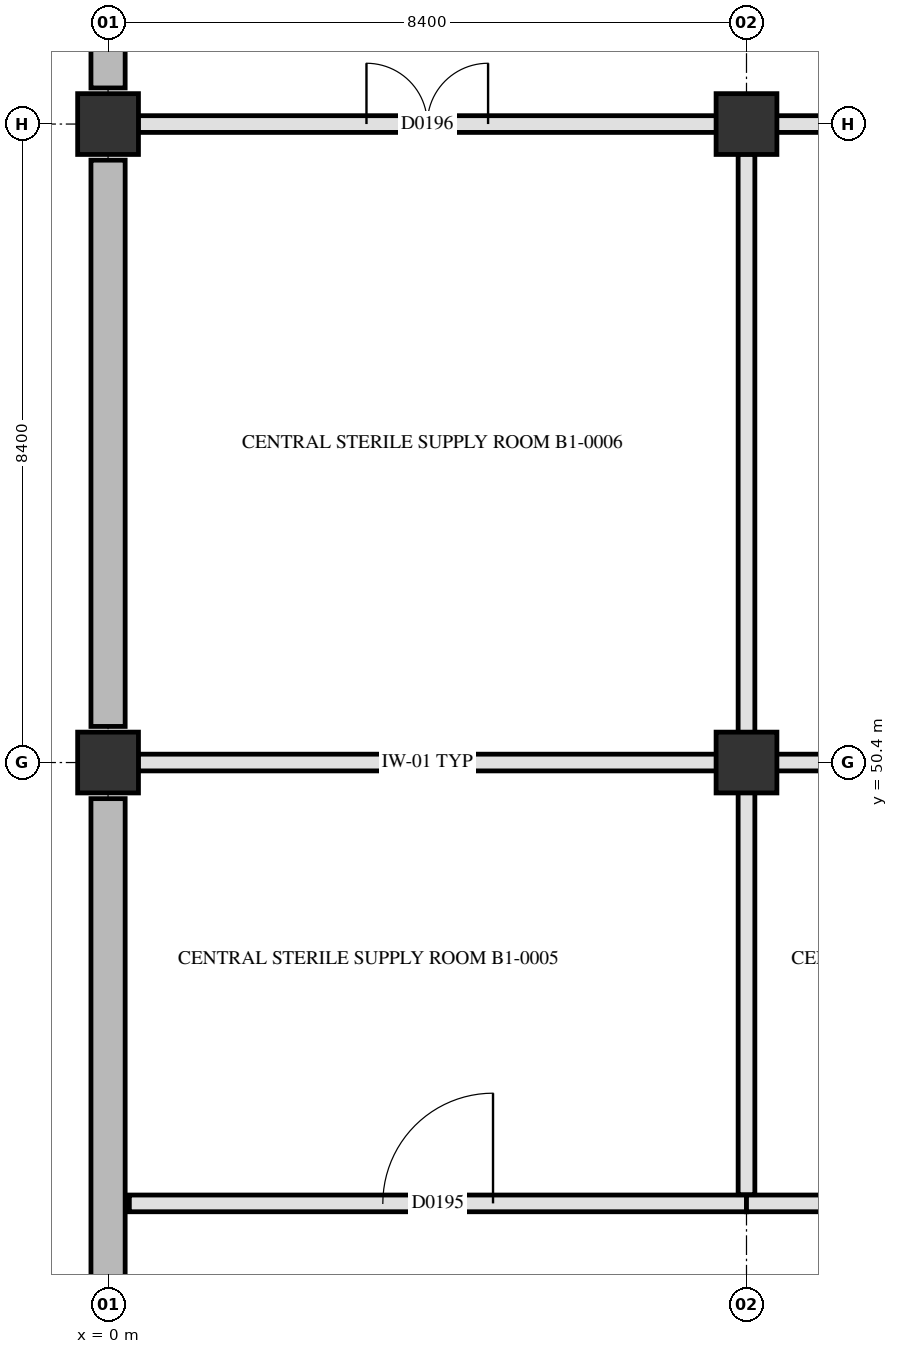
"""IFC4 building model, lengths in metres.
Left out: names, types, materials, properties, quantities, classifications, styles, units other than length and angle.
Written with IfcOpenShell. Run it as: python <this file> out.ifc"""

import sys

from ifc_helpers import new_model, si_unit, direction, frame, frame_2d, origin, origin_2d, place, context, subcontext, project, spatial, rectangle, extrude, element, fill, save


model = new_model("IFC4")
c1 = context("Model", 3, precision=1e-05, world=origin(), true_north=direction((0.0, 1.0)))
c2 = subcontext(c1, "Body", "Model", "MODEL_VIEW")
j1 = project(units=[si_unit("LENGTHUNIT", "METRE"), si_unit("PLANEANGLEUNIT", "RADIAN")], contexts=[c1])
p1 = place(None, origin())
s1 = spatial("IfcSite", under=j1, at=p1, CompositionType="ELEMENT")
p2 = place(p1, origin())
s2 = spatial("IfcBuilding", under=s1, at=p2, CompositionType="ELEMENT")
p3 = place(p2, frame((0.0, 0.0, -5.4)))
s3 = spatial("IfcBuildingStorey", under=s2, at=p3, CompositionType="ELEMENT", Elevation=-5.4)
for number, where, z_axis, x_axis in (
    (1, (0.0, 50.4, 0.0), (0.0, 0.0, 1.0), (1.0, 0.0, 0.0)),
    (2, (0.0, 58.8, 0.0), (0.0, 0.0, 1.0), (1.0, 0.0, 0.0)),
    (3, (8.4, 50.4, 0.0), (0.0, 0.0, 1.0), (1.0, 0.0, 0.0)),
    (4, (8.4, 58.8, 0.0), (0.0, 0.0, 1.0), (1.0, 0.0, 0.0)),
):
    element("IfcColumn", number, at=place(p3, frame(where, z_axis=z_axis, x_axis=x_axis)), inside=s3, PredefinedType="COLUMN", context=c2, shape_type="SweptSolid", body=[
        extrude(rectangle(XDim=0.8, YDim=0.8, at=origin_2d()), origin(), (0.0, 0.0, 1.0), 5.4),
    ])
p4 = place(p3, frame((0.0, 59.275, 0.0), z_axis=(0.0, 0.0, 1.0), x_axis=(0.0, 1.0, 0.0)))
e5 = element("IfcWall", 5, at=p4, inside=s3, PredefinedType="SOLIDWALL", context=c2, shape_type="SweptSolid", body=[
    extrude(rectangle(XDim=7.45, YDim=0.45, at=frame_2d((3.725, 0.0))), origin(), (0.0, 0.0, 1.0), 5.08),
])
for number, where, z_axis, x_axis in (
    (6, (0.0, 42.475, 0.0), (0.0, 0.0, 1.0), (0.0, 1.0, 0.0)),
    (7, (0.0, 50.875, 0.0), (0.0, 0.0, 1.0), (0.0, 1.0, 0.0)),
):
    element("IfcWall", number, at=place(p3, frame(where, z_axis=z_axis, x_axis=x_axis)), inside=s3, PredefinedType="SOLIDWALL", context=c2, shape_type="SweptSolid", body=[
        extrude(rectangle(XDim=7.45, YDim=0.45, at=frame_2d((3.725, 0.0))), origin(), (0.0, 0.0, 1.0), 5.08),
    ])
p5 = place(p3, frame((0.28, 44.6, 0.0), z_axis=(0.0, 0.0, 1.0), x_axis=(1.0, 0.0, 0.0)))
e8 = element("IfcWall", 8, at=p5, inside=s3, PredefinedType="PARTITIONING", context=c2, shape_type="SweptSolid", body=[
    extrude(rectangle(XDim=8.12, YDim=0.22, at=frame_2d((4.06, 0.0))), origin(), (0.0, 0.0, 1.0), 4.47),
])
p6 = place(p5, frame((3.335, 0.0, 0.0)))
e9 = element("IfcOpeningElement", 9, at=p6, cuts=e8, PredefinedType="OPENING", context=c2, shape_type="SweptSolid", body=[
    extrude(rectangle(XDim=1.45, YDim=2.2, at=frame_2d((0.725, 1.1))), frame((0.0, 0.12, 0.0), z_axis=(0.0, -1.0, 0.0), x_axis=(1.0, 0.0, 0.0)), (0.0, 0.0, 1.0), 0.24),
])
p7 = place(p3, frame((8.4, 44.6, 0.0), z_axis=(0.0, 0.0, 1.0), x_axis=(1.0, 0.0, 0.0)))
e10 = element("IfcWall", 10, at=p7, inside=s3, PredefinedType="PARTITIONING", context=c2, shape_type="SweptSolid", body=[
    extrude(rectangle(XDim=8.4, YDim=0.22, at=frame_2d((4.2, 0.0))), origin(), (0.0, 0.0, 1.0), 4.47),
])
p8 = place(p7, frame((3.33, 0.0, 0.0)))
e11 = element("IfcOpeningElement", 11, at=p8, cuts=e10, PredefinedType="OPENING", context=c2, shape_type="SweptSolid", body=[
    extrude(rectangle(XDim=1.74, YDim=2.24, at=frame_2d((0.87, 1.12))), frame((0.0, 0.12, 0.0), z_axis=(0.0, -1.0, 0.0), x_axis=(1.0, 0.0, 0.0)), (0.0, 0.0, 1.0), 0.24),
])
p9 = place(p3, frame((0.395, 50.4, 0.0), z_axis=(0.0, 0.0, 1.0), x_axis=(1.0, 0.0, 0.0)))
e12 = element("IfcWall", 12, at=p9, inside=s3, PredefinedType="PARTITIONING", context=c2, shape_type="SweptSolid", body=[
    extrude(rectangle(XDim=7.61, YDim=0.22, at=frame_2d((3.805, 0.0))), origin(), (0.0, 0.0, 1.0), 4.42),
])
p10 = place(p3, frame((8.795, 50.4, 0.0), z_axis=(0.0, 0.0, 1.0), x_axis=(1.0, 0.0, 0.0)))
e13 = element("IfcWall", 13, at=p10, inside=s3, PredefinedType="PARTITIONING", context=c2, shape_type="SweptSolid", body=[
    extrude(rectangle(XDim=7.61, YDim=0.22, at=frame_2d((3.805, 0.0))), origin(), (0.0, 0.0, 1.0), 4.42),
])
p11 = place(p3, frame((0.395, 58.8, 0.0), z_axis=(0.0, 0.0, 1.0), x_axis=(1.0, 0.0, 0.0)))
e14 = element("IfcWall", 14, at=p11, inside=s3, PredefinedType="PARTITIONING", context=c2, shape_type="SweptSolid", body=[
    extrude(rectangle(XDim=7.61, YDim=0.22, at=frame_2d((3.805, 0.0))), origin(), (0.0, 0.0, 1.0), 4.42),
])
p12 = place(p11, frame((3.005, 0.0, 0.0)))
e15 = element("IfcOpeningElement", 15, at=p12, cuts=e14, PredefinedType="OPENING", context=c2, shape_type="SweptSolid", body=[
    extrude(rectangle(XDim=1.6, YDim=2.25, at=frame_2d((0.8, 1.125))), frame((0.0, 0.12, 0.0), z_axis=(0.0, -1.0, 0.0), x_axis=(1.0, 0.0, 0.0)), (0.0, 0.0, 1.0), 0.24),
])
p13 = place(p3, frame((8.795, 58.8, 0.0), z_axis=(0.0, 0.0, 1.0), x_axis=(1.0, 0.0, 0.0)))
e16 = element("IfcWall", 16, at=p13, inside=s3, PredefinedType="PARTITIONING", context=c2, shape_type="SweptSolid", body=[
    extrude(rectangle(XDim=5.555, YDim=0.22, at=frame_2d((2.778, 0.0))), origin(), (0.0, 0.0, 1.0), 4.42),
])
p14 = place(p13, frame((1.857, 0.0, 0.0)))
e17 = element("IfcOpeningElement", 17, at=p14, cuts=e16, PredefinedType="OPENING", context=c2, shape_type="SweptSolid", body=[
    extrude(rectangle(XDim=1.84, YDim=2.28, at=frame_2d((0.92, 1.14))), frame((0.0, 0.12, 0.0), z_axis=(0.0, -1.0, 0.0), x_axis=(1.0, 0.0, 0.0)), (0.0, 0.0, 1.0), 0.24),
])
p15 = place(p3, frame((8.4, 44.715, 0.0), z_axis=(0.0, 0.0, 1.0), x_axis=(0.0, 1.0, 0.0)))
e18 = element("IfcWall", 18, at=p15, inside=s3, PredefinedType="PARTITIONING", context=c2, shape_type="SweptSolid", body=[
    extrude(rectangle(XDim=5.29, YDim=0.22, at=frame_2d((2.645, 0.0))), origin(), (0.0, 0.0, 1.0), 4.47),
])
p16 = place(p3, frame((8.4, 50.795, 0.0), z_axis=(0.0, 0.0, 1.0), x_axis=(0.0, 1.0, 0.0)))
e19 = element("IfcWall", 19, at=p16, inside=s3, PredefinedType="PARTITIONING", context=c2, shape_type="SweptSolid", body=[
    extrude(rectangle(XDim=7.61, YDim=0.22, at=frame_2d((3.805, 0.0))), origin(), (0.0, 0.0, 1.0), 4.47),
])
p17 = place(p6, origin())
e20 = element("IfcDoor", 20, at=p17, inside=s3, OperationType="SINGLE_SWING_RIGHT", PredefinedType="DOOR", context=c2, shape_type="SweptSolid", body=[
    extrude(rectangle(XDim=1.45, YDim=2.2, at=frame_2d((0.725, 1.1))), frame((0.0, 0.025, 0.0), z_axis=(0.0, -1.0, 0.0), x_axis=(1.0, 0.0, 0.0)), (0.0, 0.0, 1.0), 0.05),
])
fill(e9, e20)
p18 = place(p12, origin())
e21 = element("IfcDoor", 21, at=p18, inside=s3, OperationType="DOUBLE_SWING_LEFT", PredefinedType="DOOR", context=c2, shape_type="SweptSolid", body=[
    extrude(rectangle(XDim=1.6, YDim=2.25, at=frame_2d((0.8, 1.125))), frame((0.0, 0.025, 0.0), z_axis=(0.0, -1.0, 0.0), x_axis=(1.0, 0.0, 0.0)), (0.0, 0.0, 1.0), 0.05),
])
fill(e15, e21)
save(model, sys.argv[1])
